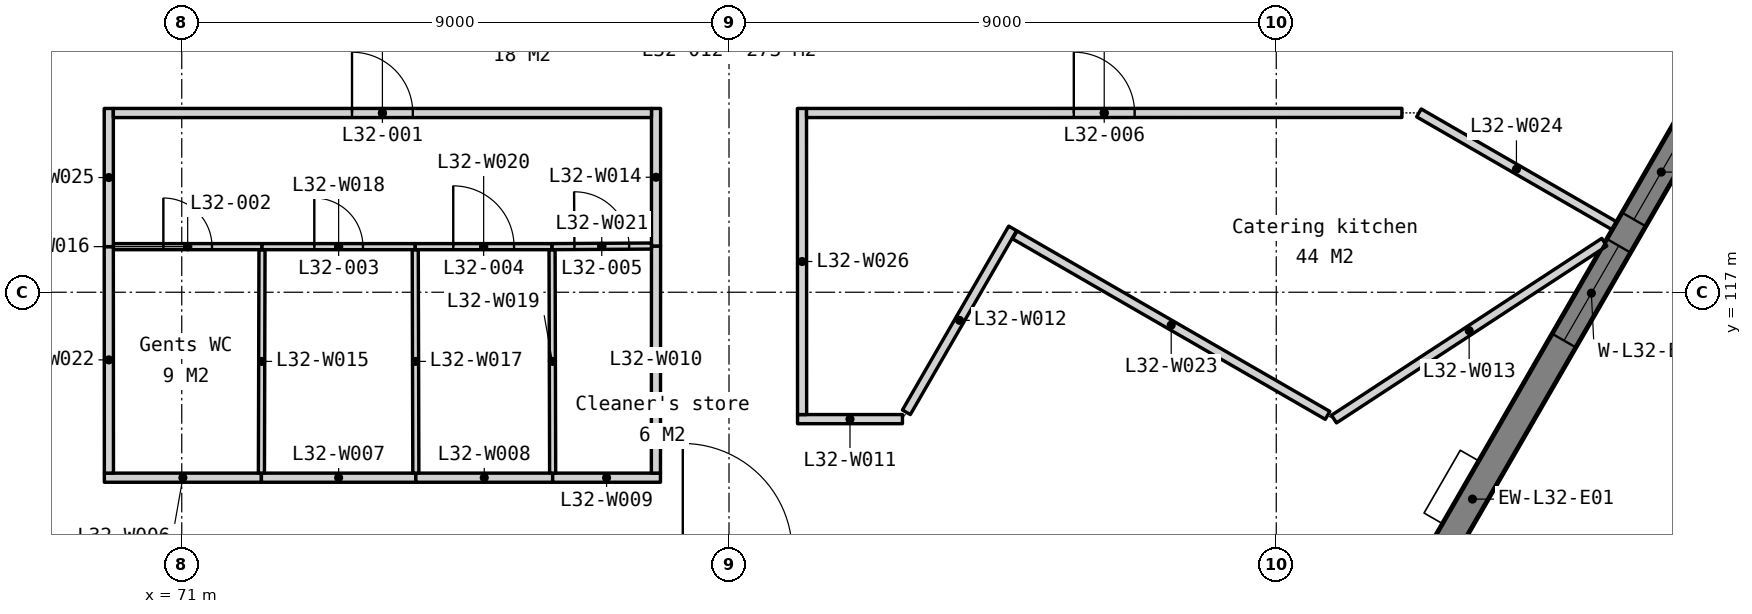
"""IFC4 building model, lengths in metres.
Left out: names, types, materials, properties, quantities, classifications, styles, units other than length and angle.
Written with IfcOpenShell. Run it as: python <this file> out.ifc"""

import sys

from ifc_helpers import new_model, si_unit, direction, frame, frame_2d, origin, place, context, subcontext, project, spatial, polyline, rectangle, outline, extrude, element, fill, save


model = new_model("IFC4")
c1 = context("Model", 3, precision=1e-05, world=origin(), true_north=direction((0.0, 1.0)))
c2 = subcontext(c1, "Body", "Model", "MODEL_VIEW")
j1 = project(units=[si_unit("LENGTHUNIT", "METRE"), si_unit("PLANEANGLEUNIT", "RADIAN")], contexts=[c1])
p1 = place(None, origin())
s1 = spatial("IfcSite", under=j1, at=p1, CompositionType="ELEMENT")
p2 = place(p1, origin())
s2 = spatial("IfcBuilding", under=s1, at=p2, CompositionType="ELEMENT")
p3 = place(p2, frame((0.0, 0.0, 128.6)))
s3 = spatial("IfcBuildingStorey", under=s2, at=p3, CompositionType="ELEMENT", Elevation=128.6)
p4 = place(p3, frame((57.652, 131.129, -0.45), z_axis=(0.0, 0.0, 1.0), x_axis=(0.499997369791, -0.866026922331, 0.0)))
e1 = element("IfcWall", 1, at=p4, inside=s3, PredefinedType="SOLIDWALL", context=c2, shape_type="SweptSolid", body=[
    extrude(outline(polyline([(40.486, 0.0), (40.486, 4.2), (0.0, 4.2), (0.0, 0.0), (40.486, 0.0)])), frame((0.0, 0.225, 0.0), z_axis=(0.0, -1.0, 0.0), x_axis=(1.0, 0.0, 0.0)), (0.0, 0.0, 1.0), 0.45),
])
p5 = place(p4, frame((3.011, 0.0, 1.25)))
e2 = element("IfcOpeningElement", 2, at=p5, cuts=e1, PredefinedType="OPENING", context=c2, shape_type="SweptSolid", body=[
    extrude(rectangle(XDim=1.8, YDim=2.2, at=frame_2d((0.9, 1.1))), frame((0.0, 0.235, 0.0), z_axis=(0.0, -1.0, 0.0), x_axis=(1.0, 0.0, 0.0)), (0.0, 0.0, 1.0), 0.47),
])
p6 = place(p4, frame((5.311, 0.0, 1.25)))
e3 = element("IfcOpeningElement", 3, at=p6, cuts=e1, PredefinedType="OPENING", context=c2, shape_type="SweptSolid", body=[
    extrude(rectangle(XDim=1.8, YDim=2.2, at=frame_2d((0.9, 1.1))), frame((0.0, 0.235, 0.0), z_axis=(0.0, -1.0, 0.0), x_axis=(1.0, 0.0, 0.0)), (0.0, 0.0, 1.0), 0.47),
])
p7 = place(p4, frame((13.132, 0.0, 1.25)))
e4 = element("IfcOpeningElement", 4, at=p7, cuts=e1, PredefinedType="OPENING", context=c2, shape_type="SweptSolid", body=[
    extrude(rectangle(XDim=1.8, YDim=2.2, at=frame_2d((0.9, 1.1))), frame((0.0, 0.235, 0.0), z_axis=(0.0, -1.0, 0.0), x_axis=(1.0, 0.0, 0.0)), (0.0, 0.0, 1.0), 0.47),
])
p8 = place(p4, frame((15.432, 0.0, 1.25)))
e5 = element("IfcOpeningElement", 5, at=p8, cuts=e1, PredefinedType="OPENING", context=c2, shape_type="SweptSolid", body=[
    extrude(rectangle(XDim=1.8, YDim=2.2, at=frame_2d((0.9, 1.1))), frame((0.0, 0.235, 0.0), z_axis=(0.0, -1.0, 0.0), x_axis=(1.0, 0.0, 0.0)), (0.0, 0.0, 1.0), 0.47),
])
p9 = place(p4, frame((23.254, 0.0, 1.25)))
e6 = element("IfcOpeningElement", 6, at=p9, cuts=e1, PredefinedType="OPENING", context=c2, shape_type="SweptSolid", body=[
    extrude(rectangle(XDim=1.8, YDim=2.2, at=frame_2d((0.9, 1.1))), frame((0.0, 0.235, 0.0), z_axis=(0.0, -1.0, 0.0), x_axis=(1.0, 0.0, 0.0)), (0.0, 0.0, 1.0), 0.47),
])
p10 = place(p4, frame((25.554, 0.0, 1.25)))
e7 = element("IfcOpeningElement", 7, at=p10, cuts=e1, PredefinedType="OPENING", context=c2, shape_type="SweptSolid", body=[
    extrude(rectangle(XDim=1.8, YDim=2.2, at=frame_2d((0.9, 1.1))), frame((0.0, 0.235, 0.0), z_axis=(0.0, -1.0, 0.0), x_axis=(1.0, 0.0, 0.0)), (0.0, 0.0, 1.0), 0.47),
])
p11 = place(p4, frame((33.375, 0.0, 1.25)))
e8 = element("IfcOpeningElement", 8, at=p11, cuts=e1, PredefinedType="OPENING", context=c2, shape_type="SweptSolid", body=[
    extrude(rectangle(XDim=1.8, YDim=2.2, at=frame_2d((0.9, 1.1))), frame((0.0, 0.235, 0.0), z_axis=(0.0, -1.0, 0.0), x_axis=(1.0, 0.0, 0.0)), (0.0, 0.0, 1.0), 0.47),
])
p12 = place(p4, frame((35.675, 0.0, 1.25)))
e9 = element("IfcOpeningElement", 9, at=p12, cuts=e1, PredefinedType="OPENING", context=c2, shape_type="SweptSolid", body=[
    extrude(rectangle(XDim=1.8, YDim=2.2, at=frame_2d((0.9, 1.1))), frame((0.0, 0.235, 0.0), z_axis=(0.0, -1.0, 0.0), x_axis=(1.0, 0.0, 0.0)), (0.0, 0.0, 1.0), 0.47),
])
p13 = place(p3, frame((82.105, 96.067, -0.45), z_axis=(0.0, 0.0, 1.0), x_axis=(0.499997369791, 0.866026922331, 0.0)))
e10 = element("IfcWall", 10, at=p13, inside=s3, PredefinedType="SOLIDWALL", context=c2, shape_type="SweptSolid", body=[
    extrude(outline(polyline([(40.486, 0.0), (40.486, 4.2), (0.0, 4.2), (0.0, 0.0), (40.486, 0.0)])), frame((0.0, 0.225, 0.0), z_axis=(0.0, -1.0, 0.0), x_axis=(1.0, 0.0, 0.0)), (0.0, 0.0, 1.0), 0.45),
])
p14 = place(p13, frame((3.011, 0.0, 1.25)))
e11 = element("IfcOpeningElement", 11, at=p14, cuts=e10, PredefinedType="OPENING", context=c2, shape_type="SweptSolid", body=[
    extrude(rectangle(XDim=1.8, YDim=2.2, at=frame_2d((0.9, 1.1))), frame((0.0, 0.235, 0.0), z_axis=(0.0, -1.0, 0.0), x_axis=(1.0, 0.0, 0.0)), (0.0, 0.0, 1.0), 0.47),
])
p15 = place(p13, frame((5.311, 0.0, 1.25)))
e12 = element("IfcOpeningElement", 12, at=p15, cuts=e10, PredefinedType="OPENING", context=c2, shape_type="SweptSolid", body=[
    extrude(rectangle(XDim=1.8, YDim=2.2, at=frame_2d((0.9, 1.1))), frame((0.0, 0.235, 0.0), z_axis=(0.0, -1.0, 0.0), x_axis=(1.0, 0.0, 0.0)), (0.0, 0.0, 1.0), 0.47),
])
p16 = place(p13, frame((13.132, 0.0, 1.25)))
e13 = element("IfcOpeningElement", 13, at=p16, cuts=e10, PredefinedType="OPENING", context=c2, shape_type="SweptSolid", body=[
    extrude(rectangle(XDim=1.8, YDim=2.2, at=frame_2d((0.9, 1.1))), frame((0.0, 0.235, 0.0), z_axis=(0.0, -1.0, 0.0), x_axis=(1.0, 0.0, 0.0)), (0.0, 0.0, 1.0), 0.47),
])
p17 = place(p13, frame((15.432, 0.0, 1.25)))
e14 = element("IfcOpeningElement", 14, at=p17, cuts=e10, PredefinedType="OPENING", context=c2, shape_type="SweptSolid", body=[
    extrude(rectangle(XDim=1.8, YDim=2.2, at=frame_2d((0.9, 1.1))), frame((0.0, 0.235, 0.0), z_axis=(0.0, -1.0, 0.0), x_axis=(1.0, 0.0, 0.0)), (0.0, 0.0, 1.0), 0.47),
])
p18 = place(p13, frame((23.254, 0.0, 1.25)))
e15 = element("IfcOpeningElement", 15, at=p18, cuts=e10, PredefinedType="OPENING", context=c2, shape_type="SweptSolid", body=[
    extrude(rectangle(XDim=1.8, YDim=2.2, at=frame_2d((0.9, 1.1))), frame((0.0, 0.235, 0.0), z_axis=(0.0, -1.0, 0.0), x_axis=(1.0, 0.0, 0.0)), (0.0, 0.0, 1.0), 0.47),
])
p19 = place(p13, frame((25.554, 0.0, 1.25)))
e16 = element("IfcOpeningElement", 16, at=p19, cuts=e10, PredefinedType="OPENING", context=c2, shape_type="SweptSolid", body=[
    extrude(rectangle(XDim=1.8, YDim=2.2, at=frame_2d((0.9, 1.1))), frame((0.0, 0.235, 0.0), z_axis=(0.0, -1.0, 0.0), x_axis=(1.0, 0.0, 0.0)), (0.0, 0.0, 1.0), 0.47),
])
p20 = place(p13, frame((33.375, 0.0, 1.25)))
e17 = element("IfcOpeningElement", 17, at=p20, cuts=e10, PredefinedType="OPENING", context=c2, shape_type="SweptSolid", body=[
    extrude(rectangle(XDim=1.8, YDim=2.2, at=frame_2d((0.9, 1.1))), frame((0.0, 0.235, 0.0), z_axis=(0.0, -1.0, 0.0), x_axis=(1.0, 0.0, 0.0)), (0.0, 0.0, 1.0), 0.47),
])
p21 = place(p13, frame((35.675, 0.0, 1.25)))
e18 = element("IfcOpeningElement", 18, at=p21, cuts=e10, PredefinedType="OPENING", context=c2, shape_type="SweptSolid", body=[
    extrude(rectangle(XDim=1.8, YDim=2.2, at=frame_2d((0.9, 1.1))), frame((0.0, 0.235, 0.0), z_axis=(0.0, -1.0, 0.0), x_axis=(1.0, 0.0, 0.0)), (0.0, 0.0, 1.0), 0.47),
])
p22 = place(p3, frame((69.727, 113.95, 0.0), z_axis=(0.0, 0.0, 1.0), x_axis=(1.0, 0.0, 0.0)))
e19 = element("IfcWall", 19, at=p22, inside=s3, PredefinedType="PARTITIONING", context=c2, shape_type="SweptSolid", body=[
    extrude(rectangle(XDim=2.583, YDim=0.15, at=frame_2d((1.292, 0.0))), origin(), (0.0, 0.0, 1.0), 3.75),
])
p23 = place(p3, frame((72.31, 113.95, 0.0), z_axis=(0.0, 0.0, 1.0), x_axis=(1.0, 0.0, 0.0)))
e20 = element("IfcWall", 20, at=p23, inside=s3, PredefinedType="PARTITIONING", context=c2, shape_type="SweptSolid", body=[
    extrude(rectangle(XDim=2.54, YDim=0.15, at=frame_2d((1.27, 0.0))), origin(), (0.0, 0.0, 1.0), 3.75),
])
p24 = place(p3, frame((74.85, 113.95, 0.0), z_axis=(0.0, 0.0, 1.0), x_axis=(1.0, 0.0, 0.0)))
e21 = element("IfcWall", 21, at=p24, inside=s3, PredefinedType="PARTITIONING", context=c2, shape_type="SweptSolid", body=[
    extrude(rectangle(XDim=2.25, YDim=0.15, at=frame_2d((1.125, 0.0))), origin(), (0.0, 0.0, 1.0), 3.75),
])
p25 = place(p3, frame((77.1, 113.95, 0.0), z_axis=(0.0, 0.0, 1.0), x_axis=(1.0, 0.0, 0.0)))
e22 = element("IfcWall", 22, at=p25, inside=s3, PredefinedType="PARTITIONING", context=c2, shape_type="SweptSolid", body=[
    extrude(rectangle(XDim=1.773, YDim=0.15, at=frame_2d((0.886, 0.0))), origin(), (0.0, 0.0, 1.0), 3.75),
])
p26 = place(p3, frame((78.798, 114.025, 0.0), z_axis=(0.0, 0.0, 1.0), x_axis=(0.000588273642, 0.999999826967, 0.0)))
e23 = element("IfcWall", 23, at=p26, inside=s3, PredefinedType="PARTITIONING", context=c2, shape_type="SweptSolid", body=[
    extrude(rectangle(XDim=3.735, YDim=0.15, at=frame_2d((1.868, 0.0))), origin(), (0.0, 0.0, 1.0), 3.75),
])
p27 = place(p3, frame((81.127, 114.913, 0.0), z_axis=(0.0, 0.0, 1.0), x_axis=(1.0, 0.0, 0.0)))
e24 = element("IfcWall", 24, at=p27, inside=s3, PredefinedType="PARTITIONING", context=c2, shape_type="SweptSolid", body=[
    extrude(rectangle(XDim=1.725, YDim=0.15, at=frame_2d((0.863, 0.0))), origin(), (0.0, 0.0, 1.0), 3.75),
])
p28 = place(p3, frame((82.917, 115.026, 0.0), z_axis=(0.0, 0.0, 1.0), x_axis=(0.500250813813, 0.865880547928, 0.0)))
e25 = element("IfcWall", 25, at=p28, inside=s3, PredefinedType="PARTITIONING", context=c2, shape_type="SweptSolid", body=[
    extrude(rectangle(XDim=3.493, YDim=0.15, at=frame_2d((1.747, 0.0))), origin(), (0.0, 0.0, 1.0), 3.75),
])
p29 = place(p3, frame((89.949, 114.914, 0.0), z_axis=(0.0, 0.0, 1.0), x_axis=(0.836714532982, 0.547639288488, 0.0)))
e26 = element("IfcWall", 26, at=p29, inside=s3, PredefinedType="PARTITIONING", context=c2, shape_type="SweptSolid", body=[
    extrude(rectangle(XDim=5.313, YDim=0.15, at=frame_2d((2.656, 0.0))), origin(), (0.0, 0.0, 1.0), 3.75),
])
p30 = place(p3, frame((78.8, 117.76, 0.0), z_axis=(0.0, 0.0, 1.0), x_axis=(0.0, 1.0, 0.0)))
e27 = element("IfcWall", 27, at=p30, inside=s3, PredefinedType="PARTITIONING", context=c2, shape_type="SweptSolid", body=[
    extrude(rectangle(XDim=2.263, YDim=0.15, at=frame_2d((1.131, 0.0))), origin(), (0.0, 0.0, 1.0), 3.75),
])
p31 = place(p3, frame((72.31, 114.025, 0.0), z_axis=(0.0, 0.0, 1.0), x_axis=(0.002590836983, 0.999996643776, 0.0)))
e28 = element("IfcWall", 28, at=p31, inside=s3, PredefinedType="PARTITIONING", context=c2, shape_type="SweptSolid", body=[
    extrude(rectangle(XDim=3.675, YDim=0.1, at=frame_2d((1.837, 0.0))), origin(), (0.0, 0.0, 1.0), 3.75),
])
p32 = place(p3, frame((69.875, 117.75, 0.0), z_axis=(0.0, 0.0, 1.0), x_axis=(1.0, 0.0, 0.0)))
e29 = element("IfcWall", 29, at=p32, inside=s3, PredefinedType="PARTITIONING", context=c2, shape_type="SweptSolid", body=[
    extrude(rectangle(XDim=2.445, YDim=0.1, at=frame_2d((1.223, 0.0))), origin(), (0.0, 0.0, 1.0), 3.75),
])
p33 = place(p32, frame((0.823, 0.0, 0.0)))
e30 = element("IfcOpeningElement", 30, at=p33, cuts=e29, PredefinedType="OPENING", context=c2, shape_type="SweptSolid", body=[
    extrude(rectangle(XDim=0.8, YDim=2.1, at=frame_2d((0.4, 1.05))), frame((0.0, 0.06, 0.0), z_axis=(0.0, -1.0, 0.0), x_axis=(1.0, 0.0, 0.0)), (0.0, 0.0, 1.0), 0.12),
])
p34 = place(p3, frame((74.85, 114.025, 0.0), z_axis=(0.0, 0.0, 1.0), x_axis=(-0.002657268237, 0.999996469457, 0.0)))
e31 = element("IfcWall", 31, at=p34, inside=s3, PredefinedType="PARTITIONING", context=c2, shape_type="SweptSolid", body=[
    extrude(rectangle(XDim=3.675, YDim=0.1, at=frame_2d((1.837, 0.0))), origin(), (0.0, 0.0, 1.0), 3.75),
])
p35 = place(p3, frame((72.32, 117.75, 0.0), z_axis=(0.0, 0.0, 1.0), x_axis=(1.0, 0.0, 0.0)))
e32 = element("IfcWall", 32, at=p35, inside=s3, PredefinedType="PARTITIONING", context=c2, shape_type="SweptSolid", body=[
    extrude(rectangle(XDim=2.52, YDim=0.1, at=frame_2d((1.26, 0.0))), origin(), (0.0, 0.0, 1.0), 3.75),
])
p36 = place(p35, frame((0.86, 0.0, 0.0)))
e33 = element("IfcOpeningElement", 33, at=p36, cuts=e32, PredefinedType="OPENING", context=c2, shape_type="SweptSolid", body=[
    extrude(rectangle(XDim=0.8, YDim=2.1, at=frame_2d((0.4, 1.05))), frame((0.0, 0.06, 0.0), z_axis=(0.0, -1.0, 0.0), x_axis=(1.0, 0.0, 0.0)), (0.0, 0.0, 1.0), 0.12),
])
p37 = place(p3, frame((77.1, 114.025, 0.0), z_axis=(0.0, 0.0, 1.0), x_axis=(-0.002657268237, 0.999996469457, 0.0)))
e34 = element("IfcWall", 34, at=p37, inside=s3, PredefinedType="PARTITIONING", context=c2, shape_type="SweptSolid", body=[
    extrude(rectangle(XDim=3.675, YDim=0.1, at=frame_2d((1.837, 0.0))), origin(), (0.0, 0.0, 1.0), 3.75),
])
p38 = place(p3, frame((74.84, 117.75, 0.0), z_axis=(0.0, 0.0, 1.0), x_axis=(1.0, 0.0, 0.0)))
e35 = element("IfcWall", 35, at=p38, inside=s3, PredefinedType="PARTITIONING", context=c2, shape_type="SweptSolid", body=[
    extrude(rectangle(XDim=2.25, YDim=0.1, at=frame_2d((1.125, 0.0))), origin(), (0.0, 0.0, 1.0), 3.75),
])
p39 = place(p38, frame((0.625, 0.0, 0.0)))
e36 = element("IfcOpeningElement", 36, at=p39, cuts=e35, PredefinedType="OPENING", context=c2, shape_type="SweptSolid", body=[
    extrude(rectangle(XDim=1.0, YDim=2.1, at=frame_2d((0.5, 1.05))), frame((0.0, 0.06, 0.0), z_axis=(0.0, -1.0, 0.0), x_axis=(1.0, 0.0, 0.0)), (0.0, 0.0, 1.0), 0.12),
])
p40 = place(p3, frame((77.09, 117.75, 0.0), z_axis=(0.0, 0.0, 1.0), x_axis=(0.999983043837, 0.005823404317, 0.0)))
e37 = element("IfcWall", 37, at=p40, inside=s3, PredefinedType="PARTITIONING", context=c2, shape_type="SweptSolid", body=[
    extrude(rectangle(XDim=1.635, YDim=0.1, at=frame_2d((0.817, 0.0))), origin(), (0.0, 0.0, 1.0), 3.75),
])
p41 = place(p40, frame((0.367, 0.0, 0.0)))
e38 = element("IfcOpeningElement", 38, at=p41, cuts=e37, PredefinedType="OPENING", context=c2, shape_type="SweptSolid", body=[
    extrude(rectangle(XDim=0.9, YDim=2.1, at=frame_2d((0.45, 1.05))), frame((0.0, 0.06, 0.0), z_axis=(0.0, -1.0, 0.0), x_axis=(1.0, 0.0, 0.0)), (0.0, 0.0, 1.0), 0.12),
])
p42 = place(p3, frame((69.802, 114.025, 0.0), z_axis=(0.0, 0.0, 1.0), x_axis=(-0.000524315041, 0.999999862547, 0.0)))
e39 = element("IfcWall", 39, at=p42, inside=s3, PredefinedType="PARTITIONING", context=c2, shape_type="SweptSolid", body=[
    extrude(rectangle(XDim=3.725, YDim=0.15, at=frame_2d((1.863, 0.0))), origin(), (0.0, 0.0, 1.0), 3.75),
])
p43 = place(p3, frame((84.701, 117.943, 0.0), z_axis=(0.0, 0.0, 1.0), x_axis=(0.86613013434, -0.499818557467, 0.0)))
e40 = element("IfcWall", 40, at=p43, inside=s3, PredefinedType="PARTITIONING", context=c2, shape_type="SweptSolid", body=[
    extrude(rectangle(XDim=5.938, YDim=0.15, at=frame_2d((2.969, 0.0))), origin(), (0.0, 0.0, 1.0), 3.75),
])
p44 = place(p3, frame((91.346, 119.95, 0.0), z_axis=(0.0, 0.0, 1.0), x_axis=(0.866027491634, -0.499996383721, 0.0)))
e41 = element("IfcWall", 41, at=p44, inside=s3, PredefinedType="PARTITIONING", context=c2, shape_type="SweptSolid", body=[
    extrude(rectangle(XDim=3.703, YDim=0.15, at=frame_2d((1.852, 0.0))), origin(), (0.0, 0.0, 1.0), 3.75),
])
p45 = place(p3, frame((69.8, 117.75, 0.0), z_axis=(0.0, 0.0, 1.0), x_axis=(0.0, 1.0, 0.0)))
e42 = element("IfcWall", 42, at=p45, inside=s3, PredefinedType="PARTITIONING", context=c2, shape_type="SweptSolid", body=[
    extrude(rectangle(XDim=2.273, YDim=0.15, at=frame_2d((1.136, 0.0))), origin(), (0.0, 0.0, 1.0), 3.75),
])
p46 = place(p3, frame((81.202, 114.988, 0.0), z_axis=(0.0, 0.0, 1.0), x_axis=(-0.000436427075, 0.999999904766, 0.0)))
e43 = element("IfcWall", 43, at=p46, inside=s3, PredefinedType="PARTITIONING", context=c2, shape_type="SweptSolid", body=[
    extrude(rectangle(XDim=5.035, YDim=0.15, at=frame_2d((2.517, 0.0))), origin(), (0.0, 0.0, 1.0), 3.75),
])
p47 = place(p3, frame((69.875, 119.948, 0.0), z_axis=(0.0, 0.0, 1.0), x_axis=(1.0, 0.0, 0.0)))
e44 = element("IfcWall", 44, at=p47, inside=s3, PredefinedType="PARTITIONING", context=c2, shape_type="SweptSolid", body=[
    extrude(rectangle(XDim=8.85, YDim=0.15, at=frame_2d((4.425, 0.0))), origin(), (0.0, 0.0, 1.0), 3.75),
])
p48 = place(p47, frame((3.925, 0.0, 0.0)))
e45 = element("IfcOpeningElement", 45, at=p48, cuts=e44, PredefinedType="OPENING", context=c2, shape_type="SweptSolid", body=[
    extrude(rectangle(XDim=1.0, YDim=2.1, at=frame_2d((0.5, 1.05))), frame((0.0, 0.085, 0.0), z_axis=(0.0, -1.0, 0.0), x_axis=(1.0, 0.0, 0.0)), (0.0, 0.0, 1.0), 0.17),
])
p49 = place(p3, frame((81.275, 119.948, 0.0), z_axis=(0.0, 0.0, 1.0), x_axis=(0.999999984769, 0.000174533121, 0.0)))
e46 = element("IfcWall", 46, at=p49, inside=s3, PredefinedType="PARTITIONING", context=c2, shape_type="SweptSolid", body=[
    extrude(rectangle(XDim=9.792, YDim=0.15, at=frame_2d((4.896, 0.0))), origin(), (0.0, 0.0, 1.0), 3.75),
])
p50 = place(p49, frame((4.396, 0.0, 0.0)))
e47 = element("IfcOpeningElement", 47, at=p50, cuts=e46, PredefinedType="OPENING", context=c2, shape_type="SweptSolid", body=[
    extrude(rectangle(XDim=1.0, YDim=2.1, at=frame_2d((0.5, 1.05))), frame((0.0, 0.085, 0.0), z_axis=(0.0, -1.0, 0.0), x_axis=(1.0, 0.0, 0.0)), (0.0, 0.0, 1.0), 0.17),
])
p51 = place(p18, origin())
e48 = element("IfcWindow", 48, at=p51, inside=s3, PartitioningType="SINGLE_PANEL", PredefinedType="WINDOW", context=c2, shape_type="SweptSolid", body=[
    extrude(rectangle(XDim=1.8, YDim=2.2, at=frame_2d((0.9, 1.1))), frame((0.0, 0.03, 0.0), z_axis=(0.0, -1.0, 0.0), x_axis=(1.0, 0.0, 0.0)), (0.0, 0.0, 1.0), 0.06),
])
fill(e15, e48)
p52 = place(p19, origin())
e49 = element("IfcWindow", 49, at=p52, inside=s3, PartitioningType="SINGLE_PANEL", PredefinedType="WINDOW", context=c2, shape_type="SweptSolid", body=[
    extrude(rectangle(XDim=1.8, YDim=2.2, at=frame_2d((0.9, 1.1))), frame((0.0, 0.03, 0.0), z_axis=(0.0, -1.0, 0.0), x_axis=(1.0, 0.0, 0.0)), (0.0, 0.0, 1.0), 0.06),
])
fill(e16, e49)
p53 = place(p48, origin())
e50 = element("IfcDoor", 50, at=p53, inside=s3, OperationType="SINGLE_SWING_LEFT", PredefinedType="DOOR", context=c2, shape_type="SweptSolid", body=[
    extrude(rectangle(XDim=1.0, YDim=2.1, at=frame_2d((0.5, 1.05))), frame((0.0, 0.025, 0.0), z_axis=(0.0, -1.0, 0.0), x_axis=(1.0, 0.0, 0.0)), (0.0, 0.0, 1.0), 0.05),
])
fill(e45, e50)
p54 = place(p33, origin())
e51 = element("IfcDoor", 51, at=p54, inside=s3, OperationType="SINGLE_SWING_LEFT", PredefinedType="DOOR", context=c2, shape_type="SweptSolid", body=[
    extrude(rectangle(XDim=0.8, YDim=2.1, at=frame_2d((0.4, 1.05))), frame((0.0, 0.025, 0.0), z_axis=(0.0, -1.0, 0.0), x_axis=(1.0, 0.0, 0.0)), (0.0, 0.0, 1.0), 0.05),
])
fill(e30, e51)
p55 = place(p36, origin())
e52 = element("IfcDoor", 52, at=p55, inside=s3, OperationType="SINGLE_SWING_LEFT", PredefinedType="DOOR", context=c2, shape_type="SweptSolid", body=[
    extrude(rectangle(XDim=0.8, YDim=2.1, at=frame_2d((0.4, 1.05))), frame((0.0, 0.025, 0.0), z_axis=(0.0, -1.0, 0.0), x_axis=(1.0, 0.0, 0.0)), (0.0, 0.0, 1.0), 0.05),
])
fill(e33, e52)
p56 = place(p39, origin())
e53 = element("IfcDoor", 53, at=p56, inside=s3, OperationType="SINGLE_SWING_LEFT", PredefinedType="DOOR", context=c2, shape_type="SweptSolid", body=[
    extrude(rectangle(XDim=1.0, YDim=2.1, at=frame_2d((0.5, 1.05))), frame((0.0, 0.025, 0.0), z_axis=(0.0, -1.0, 0.0), x_axis=(1.0, 0.0, 0.0)), (0.0, 0.0, 1.0), 0.05),
])
fill(e36, e53)
p57 = place(p41, origin())
e54 = element("IfcDoor", 54, at=p57, inside=s3, OperationType="SINGLE_SWING_LEFT", PredefinedType="DOOR", context=c2, shape_type="SweptSolid", body=[
    extrude(rectangle(XDim=0.9, YDim=2.1, at=frame_2d((0.45, 1.05))), frame((0.0, 0.025, 0.0), z_axis=(0.0, -1.0, 0.0), x_axis=(1.0, 0.0, 0.0)), (0.0, 0.0, 1.0), 0.05),
])
fill(e38, e54)
p58 = place(p50, origin())
e55 = element("IfcDoor", 55, at=p58, inside=s3, OperationType="SINGLE_SWING_LEFT", PredefinedType="DOOR", context=c2, shape_type="SweptSolid", body=[
    extrude(rectangle(XDim=1.0, YDim=2.1, at=frame_2d((0.5, 1.05))), frame((0.0, 0.025, 0.0), z_axis=(0.0, -1.0, 0.0), x_axis=(1.0, 0.0, 0.0)), (0.0, 0.0, 1.0), 0.05),
])
fill(e47, e55)
save(model, sys.argv[1])
